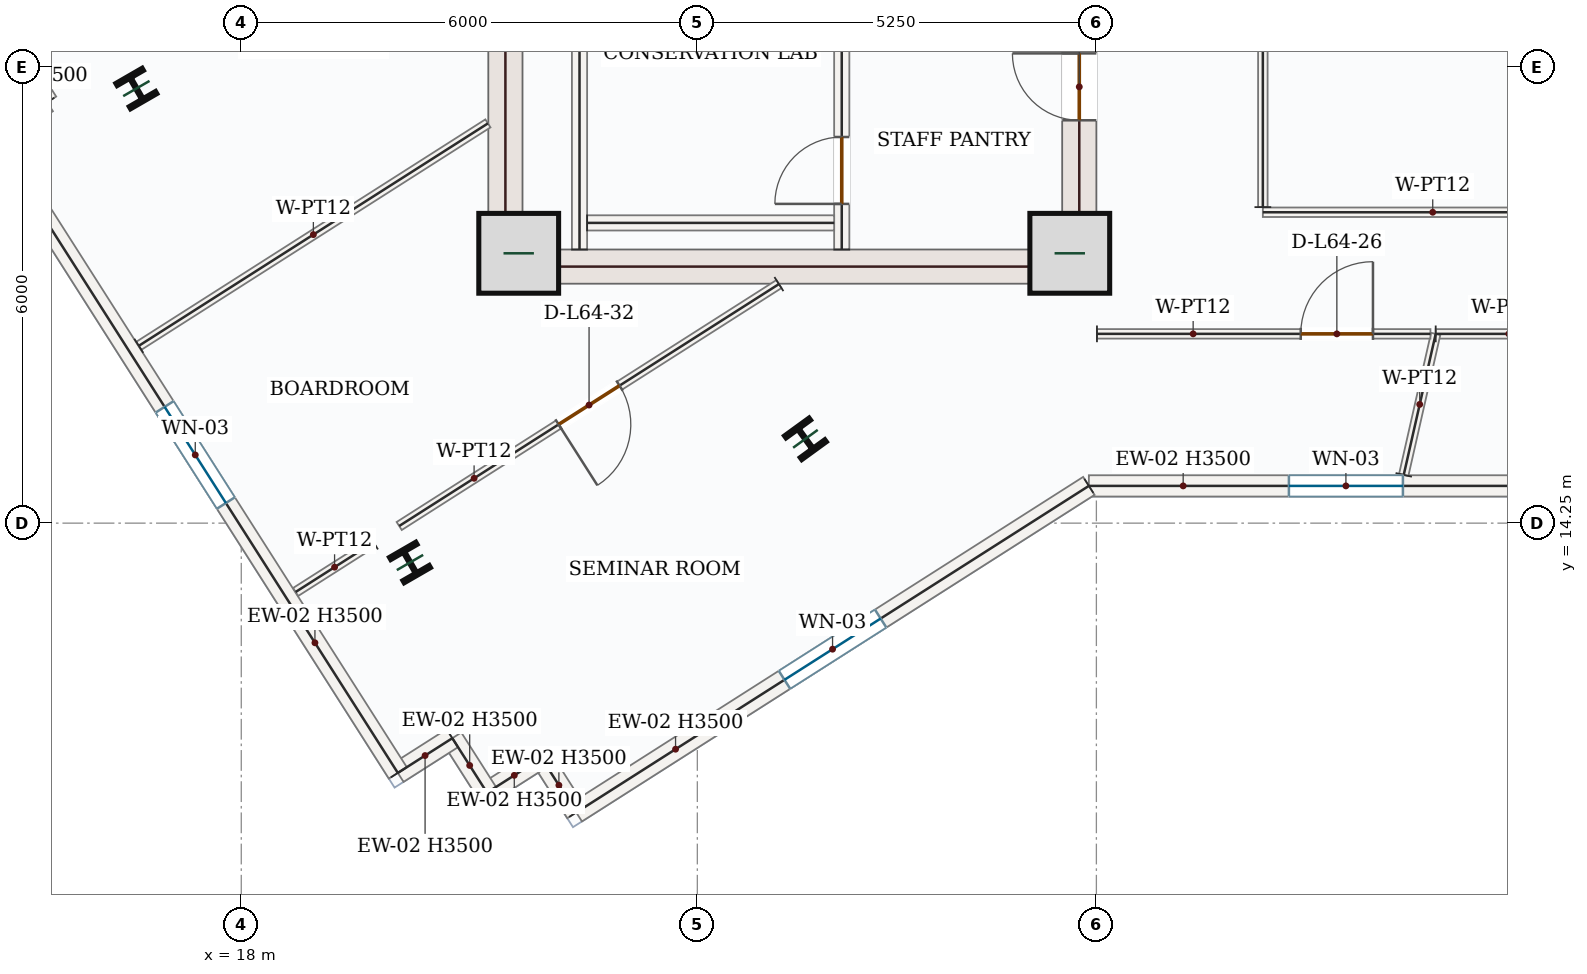
"""IFC4 building model, lengths in metres.
Left out: names, types, materials, properties, quantities, classifications, styles, units other than length and angle.
Written with IfcOpenShell. Run it as: python <this file> out.ifc"""

import sys

from ifc_helpers import new_model, si_unit, direction, frame, frame_2d, origin, origin_2d, place, context, subcontext, project, spatial, rectangle, i_section, extrude, source, transform, mapped, element, fill, save


model = new_model("IFC4")
c1 = context("Model", 3, precision=1e-05, world=origin(), true_north=direction((0.0, 1.0)))
c2 = subcontext(c1, "Body", "Model", "MODEL_VIEW")
j1 = project(units=[si_unit("LENGTHUNIT", "METRE"), si_unit("PLANEANGLEUNIT", "RADIAN")], contexts=[c1])
p1 = place(None, origin())
s1 = spatial("IfcSite", under=j1, at=p1, CompositionType="ELEMENT")
p2 = place(p1, origin())
s2 = spatial("IfcBuilding", under=s1, at=p2, CompositionType="ELEMENT")
p3 = place(p2, frame((0.0, 0.0, 269.1)))
s3 = spatial("IfcBuildingStorey", under=s2, at=p3, CompositionType="ELEMENT", Elevation=269.1)
m1 = source(origin(), c2, "Body", "SweptSolid", [
    extrude(rectangle(XDim=8.55, YDim=0.45, at=frame_2d((4.275, 0.0))), origin(), (0.0, 0.0, 1.0), 3.5),
])
p4 = place(p3, frame((21.475, 17.4, 0.0), z_axis=(0.0, 0.0, 1.0), x_axis=(0.0, 1.0, 0.0)))
e1 = element("IfcWall", 1, at=p4, inside=s3, PredefinedType="SHEAR", context=c2, shape_type="MappedRepresentation", body=[
    mapped(m1, transform((0.0, 0.0, 0.0), x_axis=(1.0, 0.0, 0.0), y_axis=(0.0, 1.0, 0.0), z_axis=(0.0, 0.0, 1.0), scale=1.0)),
])
p5 = place(p3, frame((29.025, 17.4, 0.0), z_axis=(0.0, 0.0, 1.0), x_axis=(0.0, 1.0, 0.0)))
e2 = element("IfcWall", 2, at=p5, inside=s3, PredefinedType="SHEAR", context=c2, shape_type="SweptSolid", body=[
    extrude(rectangle(XDim=8.55, YDim=0.45, at=frame_2d((4.275, 0.0))), origin(), (0.0, 0.0, 1.0), 3.5),
])
p6 = place(p5, frame((6.65, 0.0, 0.0)))
e3 = element("IfcOpeningElement", 3, at=p6, cuts=e2, PredefinedType="OPENING", context=c2, shape_type="SweptSolid", body=[
    extrude(rectangle(XDim=1.1, YDim=2.2, at=frame_2d((0.55, 1.1))), frame((0.0, 0.235, 0.0), z_axis=(0.0, -1.0, 0.0), x_axis=(1.0, 0.0, 0.0)), (0.0, 0.0, 1.0), 0.47),
])
p7 = place(p5, frame((2.15, 0.0, 0.0)))
e4 = element("IfcOpeningElement", 4, at=p7, cuts=e2, PredefinedType="OPENING", context=c2, shape_type="SweptSolid", body=[
    extrude(rectangle(XDim=0.88, YDim=2.1, at=frame_2d((0.44, 1.05))), frame((0.0, 0.235, 0.0), z_axis=(0.0, -1.0, 0.0), x_axis=(1.0, 0.0, 0.0)), (0.0, 0.0, 1.0), 0.47),
])
p8 = place(p5, frame((4.25, 0.0, 0.0)))
e5 = element("IfcOpeningElement", 5, at=p8, cuts=e2, PredefinedType="OPENING", context=c2, shape_type="SweptSolid", body=[
    extrude(rectangle(XDim=0.88, YDim=2.1, at=frame_2d((0.44, 1.05))), frame((0.0, 0.235, 0.0), z_axis=(0.0, -1.0, 0.0), x_axis=(1.0, 0.0, 0.0)), (0.0, 0.0, 1.0), 0.47),
])
m2 = source(origin(), c2, "Body", "SweptSolid", [
    extrude(rectangle(XDim=7.1, YDim=0.45, at=frame_2d((3.55, 0.0))), origin(), (0.0, 0.0, 1.0), 3.5),
])
p9 = place(p3, frame((21.7, 17.625, 0.0), z_axis=(0.0, 0.0, 1.0), x_axis=(1.0, 0.0, 0.0)))
e6 = element("IfcWall", 6, at=p9, inside=s3, PredefinedType="SHEAR", context=c2, shape_type="MappedRepresentation", body=[
    mapped(m2, transform((0.0, 0.0, 0.0), x_axis=(1.0, 0.0, 0.0), y_axis=(0.0, 1.0, 0.0), z_axis=(0.0, 0.0, 1.0), scale=1.0)),
])
m3 = source(origin(), c2, "Body", "SweptSolid", [
    extrude(rectangle(XDim=1.05, YDim=1.05, at=origin_2d()), origin(), (0.0, 0.0, 1.0), 3.75),
])
for number, where, z_axis, x_axis in (
    (7, (21.65, 17.8, 0.0), (0.0, 0.0, 1.0), (1.0, 0.0, 0.0)),
    (8, (28.9, 17.8, 0.0), (0.0, 0.0, 1.0), (1.0, 0.0, 0.0)),
):
    element("IfcColumn", number, at=place(p3, frame(where, z_axis=z_axis, x_axis=x_axis)), inside=s3, PredefinedType="COLUMN", context=c2, shape_type="MappedRepresentation", body=[
        mapped(m3, transform((0.0, 0.0, 0.0), x_axis=(1.0, 0.0, 0.0), y_axis=(0.0, 1.0, 0.0), z_axis=(0.0, 0.0, 1.0), scale=1.0)),
    ])
m4 = source(origin(), c2, "Body", "SweptSolid", [
    extrude(i_section(OverallWidth=0.399, OverallDepth=0.386, WebThickness=0.021, FlangeThickness=0.033, FilletRadius=0.018, at=origin_2d()), origin(), (0.0, 0.0, 1.0), 3.75),
])
for number, where, z_axis, x_axis in (
    (9, (25.422, 15.359, 0.0), (0.0, 0.0, 1.0), (0.809, 0.588, 0.0)),
    (10, (16.62, 19.968, 0.0), (0.0, 0.0, 1.0), (0.866, 0.5, 0.0)),
    (11, (20.22, 13.732, 0.0), (0.0, 0.0, 1.0), (0.866, 0.5, 0.0)),
):
    element("IfcColumn", number, at=place(p3, frame(where, z_axis=z_axis, x_axis=x_axis)), inside=s3, PredefinedType="COLUMN", context=c2, shape_type="MappedRepresentation", body=[
        mapped(m4, transform((0.0, 0.0, 0.0), x_axis=(1.0, 0.0, 0.0), y_axis=(0.0, 1.0, 0.0), z_axis=(0.0, 0.0, 1.0), scale=1.0)),
    ])
p10 = place(p3, frame((35.914, 14.74, 0.0), z_axis=(0.0, 0.0, 1.0), x_axis=(-1.0, 0.0, 0.0)))
e12 = element("IfcWall", 12, at=p10, inside=s3, PredefinedType="SOLIDWALL", context=c2, shape_type="SweptSolid", body=[
    extrude(rectangle(XDim=6.763, YDim=0.28, at=frame_2d((3.381, 0.0))), origin(), (0.0, 0.0, 1.0), 3.5),
])
p11 = place(p10, frame((2.631, 0.0, 0.85)))
e13 = element("IfcOpeningElement", 13, at=p11, cuts=e12, PredefinedType="OPENING", context=c2, shape_type="SweptSolid", body=[
    extrude(rectangle(XDim=1.5, YDim=1.5, at=frame_2d((0.75, 0.75))), frame((0.0, 0.15, 0.0), z_axis=(0.0, -1.0, 0.0), x_axis=(1.0, 0.0, 0.0)), (0.0, 0.0, 1.0), 0.3),
])
p12 = place(p3, frame((29.151, 14.74, 0.0), z_axis=(0.0, 0.0, 1.0), x_axis=(-0.843388565396, -0.537304129669, 0.0)))
e14 = element("IfcWall", 14, at=p12, inside=s3, PredefinedType="SOLIDWALL", context=c2, shape_type="SweptSolid", body=[
    extrude(rectangle(XDim=7.996, YDim=0.28, at=frame_2d((3.998, 0.0))), origin(), (0.0, 0.0, 1.0), 3.5),
])
p13 = place(p12, frame((3.248, 0.0, 0.85)))
e15 = element("IfcOpeningElement", 15, at=p13, cuts=e14, PredefinedType="OPENING", context=c2, shape_type="SweptSolid", body=[
    extrude(rectangle(XDim=1.5, YDim=1.5, at=frame_2d((0.75, 0.75))), frame((0.0, 0.15, 0.0), z_axis=(0.0, -1.0, 0.0), x_axis=(1.0, 0.0, 0.0)), (0.0, 0.0, 1.0), 0.3),
])
m5 = source(origin(), c2, "Body", "SweptSolid", [
    extrude(rectangle(XDim=0.85, YDim=0.28, at=frame_2d((0.425, 0.0))), origin(), (0.0, 0.0, 1.0), 3.5),
])
for number, where, z_axis, x_axis in (
    (16, (22.407, 10.444, 0.0), (0.0, 0.0, 1.0), (-0.537, 0.843, 0.0)),
    (17, (21.95, 11.16, 0.0), (0.0, 0.0, 1.0), (-0.843, -0.537, 0.0)),
    (18, (21.233, 10.704, 0.0), (0.0, 0.0, 1.0), (-0.537, 0.843, 0.0)),
    (19, (20.777, 11.421, 0.0), (0.0, 0.0, 1.0), (-0.843, -0.537, 0.0)),
):
    element("IfcWall", number, at=place(p3, frame(where, z_axis=z_axis, x_axis=x_axis)), inside=s3, PredefinedType="SOLIDWALL", context=c2, shape_type="MappedRepresentation", body=[
        mapped(m5, transform((0.0, 0.0, 0.0), x_axis=(1.0, 0.0, 0.0), y_axis=(0.0, 1.0, 0.0), z_axis=(0.0, 0.0, 1.0), scale=1.0)),
    ])
p14 = place(p3, frame((20.06, 10.964, 0.0), z_axis=(0.0, 0.0, 1.0), x_axis=(-0.537314949054, 0.843381672508, 0.0)))
e20 = element("IfcWall", 20, at=p14, inside=s3, PredefinedType="SOLIDWALL", context=c2, shape_type="SweptSolid", body=[
    extrude(rectangle(XDim=9.92, YDim=0.28, at=frame_2d((4.96, 0.0))), origin(), (0.0, 0.0, 1.0), 3.5),
])
p15 = place(p14, frame((4.21, 0.0, 0.85)))
e21 = element("IfcOpeningElement", 21, at=p15, cuts=e20, PredefinedType="OPENING", context=c2, shape_type="SweptSolid", body=[
    extrude(rectangle(XDim=1.5, YDim=1.5, at=frame_2d((0.75, 0.75))), frame((0.0, 0.15, 0.0), z_axis=(0.0, -1.0, 0.0), x_axis=(1.0, 0.0, 0.0)), (0.0, 0.0, 1.0), 0.3),
])
m6 = source(origin(), c2, "Body", "SweptSolid", [
    extrude(rectangle(XDim=0.85, YDim=0.28, at=frame_2d((0.425, 0.0))), origin(), (0.0, 0.0, 1.0), 3.5),
])
p16 = place(p3, frame((14.73, 19.33, 0.0), z_axis=(0.0, 0.0, 1.0), x_axis=(0.843401251716, 0.537284215853, 0.0)))
e22 = element("IfcWall", 22, at=p16, inside=s3, PredefinedType="SOLIDWALL", context=c2, shape_type="MappedRepresentation", body=[
    mapped(m6, transform((0.0, 0.0, 0.0), x_axis=(1.0, 0.0, 0.0), y_axis=(0.0, 1.0, 0.0), z_axis=(0.0, 0.0, 1.0), scale=1.0)),
])
for number, where, z_axis, x_axis in (
    (23, (15.447, 19.787, 0.0), (0.0, 0.0, 1.0), (-0.537, 0.843, 0.0)),
    (24, (14.99, 20.504, 0.0), (0.0, 0.0, 1.0), (0.843, 0.537, 0.0)),
):
    element("IfcWall", number, at=place(p3, frame(where, z_axis=z_axis, x_axis=x_axis)), inside=s3, PredefinedType="SOLIDWALL", context=c2, shape_type="MappedRepresentation", body=[
        mapped(m5, transform((0.0, 0.0, 0.0), x_axis=(1.0, 0.0, 0.0), y_axis=(0.0, 1.0, 0.0), z_axis=(0.0, 0.0, 1.0), scale=1.0)),
    ])
m7 = source(origin(), c2, "Body", "SweptSolid", [
    extrude(rectangle(XDim=7.87, YDim=0.2, at=frame_2d((3.935, 0.0))), origin(), (0.0, 0.0, 1.0), 3.5),
])
p17 = place(p3, frame((22.45, 17.85, 0.0), z_axis=(0.0, 0.0, 1.0), x_axis=(0.0, 1.0, 0.0)))
e25 = element("IfcWall", 25, at=p17, inside=s3, PredefinedType="SOLIDWALL", context=c2, shape_type="MappedRepresentation", body=[
    mapped(m7, transform((0.0, 0.0, 0.0), x_axis=(1.0, 0.0, 0.0), y_axis=(0.0, 1.0, 0.0), z_axis=(0.0, 0.0, 1.0), scale=1.0)),
])
p18 = place(p3, frame((25.9, 17.85, 0.0), z_axis=(0.0, 0.0, 1.0), x_axis=(0.0, 1.0, 0.0)))
e26 = element("IfcWall", 26, at=p18, inside=s3, PredefinedType="SOLIDWALL", context=c2, shape_type="SweptSolid", body=[
    extrude(rectangle(XDim=8.0, YDim=0.2, at=frame_2d((4.0, 0.0))), origin(), (0.0, 0.0, 1.0), 3.5),
])
p19 = place(p18, frame((6.2, 0.0, 0.0)))
e27 = element("IfcOpeningElement", 27, at=p19, cuts=e26, PredefinedType="OPENING", context=c2, shape_type="SweptSolid", body=[
    extrude(rectangle(XDim=1.0, YDim=2.15, at=frame_2d((0.5, 1.075))), frame((0.0, 0.11, 0.0), z_axis=(0.0, -1.0, 0.0), x_axis=(1.0, 0.0, 0.0)), (0.0, 0.0, 1.0), 0.22),
])
p20 = place(p18, frame((0.6, 0.0, 0.0)))
e28 = element("IfcOpeningElement", 28, at=p20, cuts=e26, PredefinedType="OPENING", context=c2, shape_type="SweptSolid", body=[
    extrude(rectangle(XDim=0.88, YDim=2.1, at=frame_2d((0.44, 1.05))), frame((0.0, 0.11, 0.0), z_axis=(0.0, -1.0, 0.0), x_axis=(1.0, 0.0, 0.0)), (0.0, 0.0, 1.0), 0.22),
])
m8 = source(origin(), c2, "Body", "SweptSolid", [
    extrude(rectangle(XDim=3.25, YDim=0.2, at=frame_2d((1.625, 0.0))), origin(), (0.0, 0.0, 1.0), 3.5),
])
p21 = place(p3, frame((22.55, 18.2, 0.0), z_axis=(0.0, 0.0, 1.0), x_axis=(1.0, 0.0, 0.0)))
e29 = element("IfcWall", 29, at=p21, inside=s3, PredefinedType="SOLIDWALL", context=c2, shape_type="MappedRepresentation", body=[
    mapped(m8, transform((0.0, 0.0, 0.0), x_axis=(1.0, 0.0, 0.0), y_axis=(0.0, 1.0, 0.0), z_axis=(0.0, 0.0, 1.0), scale=1.0)),
])
p22 = place(p3, frame((25.073, 17.395, 0.0), z_axis=(0.0, 0.0, 1.0), x_axis=(-0.843398332862, -0.537288797693, 0.0)))
e30 = element("IfcWall", 30, at=p22, inside=s3, PredefinedType="PARTITIONING", context=c2, shape_type="SweptSolid", body=[
    extrude(rectangle(XDim=5.924, YDim=0.125, at=frame_2d((2.962, 0.0))), origin(), (0.0, 0.0, 1.0), 3.5),
])
p23 = place(p22, frame((2.487, 0.0, 0.0)))
e31 = element("IfcOpeningElement", 31, at=p23, cuts=e30, PredefinedType="OPENING", context=c2, shape_type="SweptSolid", body=[
    extrude(rectangle(XDim=0.95, YDim=2.15, at=frame_2d((0.475, 1.075))), frame((0.0, 0.073, 0.0), z_axis=(0.0, -1.0, 0.0), x_axis=(1.0, 0.0, 0.0)), (0.0, 0.0, 1.0), 0.145),
])
m9 = source(origin(), c2, "Body", "SweptSolid", [
    extrude(rectangle(XDim=1.215, YDim=0.125, at=frame_2d((0.607, 0.0))), origin(), (0.0, 0.0, 1.0), 3.5),
])
p24 = place(p3, frame((19.74, 13.997, 0.0), z_axis=(0.0, 0.0, 1.0), x_axis=(-0.84340481812, -0.537278617453, 0.0)))
e32 = element("IfcWall", 32, at=p24, inside=s3, PredefinedType="PARTITIONING", context=c2, shape_type="MappedRepresentation", body=[
    mapped(m9, transform((0.0, 0.0, 0.0), x_axis=(1.0, 0.0, 0.0), y_axis=(0.0, 1.0, 0.0), z_axis=(0.0, 0.0, 1.0), scale=1.0)),
])
m10 = source(origin(), c2, "Body", "SweptSolid", [
    extrude(rectangle(XDim=5.446, YDim=0.125, at=frame_2d((2.723, 0.0))), origin(), (0.0, 0.0, 1.0), 3.5),
])
p25 = place(p3, frame((16.652, 16.583, 0.0), z_axis=(0.0, 0.0, 1.0), x_axis=(0.843395566027, 0.537293140851, 0.0)))
e33 = element("IfcWall", 33, at=p25, inside=s3, PredefinedType="PARTITIONING", context=c2, shape_type="MappedRepresentation", body=[
    mapped(m10, transform((0.0, 0.0, 0.0), x_axis=(1.0, 0.0, 0.0), y_axis=(0.0, 1.0, 0.0), z_axis=(0.0, 0.0, 1.0), scale=1.0)),
])
m11 = source(origin(), c2, "Body", "SweptSolid", [
    extrude(rectangle(XDim=4.47, YDim=0.125, at=frame_2d((2.235, 0.0))), origin(), (0.0, 0.0, 1.0), 3.5),
])
p26 = place(p3, frame((35.91, 18.34, 0.0), z_axis=(0.0, 0.0, 1.0), x_axis=(-1.0, 0.0, 0.0)))
e34 = element("IfcWall", 34, at=p26, inside=s3, PredefinedType="PARTITIONING", context=c2, shape_type="MappedRepresentation", body=[
    mapped(m11, transform((0.0, 0.0, 0.0), x_axis=(1.0, 0.0, 0.0), y_axis=(0.0, 1.0, 0.0), z_axis=(0.0, 0.0, 1.0), scale=1.0)),
])
m12 = source(origin(), c2, "Body", "SweptSolid", [
    extrude(rectangle(XDim=7.403, YDim=0.125, at=frame_2d((3.701, 0.0))), origin(), (0.0, 0.0, 1.0), 3.5),
])
p27 = place(p3, frame((31.44, 18.407, 0.0), z_axis=(0.0, 0.0, 1.0), x_axis=(0.0, 1.0, 0.0)))
e35 = element("IfcWall", 35, at=p27, inside=s3, PredefinedType="PARTITIONING", context=c2, shape_type="MappedRepresentation", body=[
    mapped(m12, transform((0.0, 0.0, 0.0), x_axis=(1.0, 0.0, 0.0), y_axis=(0.0, 1.0, 0.0), z_axis=(0.0, 0.0, 1.0), scale=1.0)),
])
p28 = place(p3, frame((33.714, 16.74, 0.0), z_axis=(0.0, 0.0, 1.0), x_axis=(1.0, 0.0, 0.0)))
e36 = element("IfcWall", 36, at=p28, inside=s3, PredefinedType="PARTITIONING", context=c2, shape_type="SweptSolid", body=[
    extrude(rectangle(XDim=5.099, YDim=0.125, at=frame_2d((2.55, 0.0))), origin(), (0.0, 0.0, 1.0), 3.5),
])
p29 = place(p28, frame((2.075, 0.0, 0.0)))
e37 = element("IfcOpeningElement", 37, at=p29, cuts=e36, PredefinedType="OPENING", context=c2, shape_type="SweptSolid", body=[
    extrude(rectangle(XDim=0.95, YDim=2.15, at=frame_2d((0.475, 1.075))), frame((0.0, 0.073, 0.0), z_axis=(0.0, -1.0, 0.0), x_axis=(1.0, 0.0, 0.0)), (0.0, 0.0, 1.0), 0.145),
])
m13 = source(origin(), c2, "Body", "SweptSolid", [
    extrude(rectangle(XDim=1.902, YDim=0.125, at=frame_2d((0.951, 0.0))), origin(), (0.0, 0.0, 1.0), 3.5),
])
p30 = place(p3, frame((33.294, 14.885, 0.0), z_axis=(0.0, 0.0, 1.0), x_axis=(0.221032985594, 0.975266332485, 0.0)))
e38 = element("IfcWall", 38, at=p30, inside=s3, PredefinedType="PARTITIONING", context=c2, shape_type="MappedRepresentation", body=[
    mapped(m13, transform((0.0, 0.0, 0.0), x_axis=(1.0, 0.0, 0.0), y_axis=(0.0, 1.0, 0.0), z_axis=(0.0, 0.0, 1.0), scale=1.0)),
])
p31 = place(p3, frame((29.258, 16.74, 0.0), z_axis=(0.0, 0.0, 1.0), x_axis=(0.999999998452, -5.5645206e-05, 0.0)))
e39 = element("IfcWall", 39, at=p31, inside=s3, PredefinedType="PARTITIONING", context=c2, shape_type="SweptSolid", body=[
    extrude(rectangle(XDim=4.387, YDim=0.125, at=frame_2d((2.194, 0.0))), origin(), (0.0, 0.0, 1.0), 3.5),
])
p32 = place(p31, frame((2.681, 0.0, 0.0)))
e40 = element("IfcOpeningElement", 40, at=p32, cuts=e39, PredefinedType="OPENING", context=c2, shape_type="SweptSolid", body=[
    extrude(rectangle(XDim=0.95, YDim=2.15, at=frame_2d((0.475, 1.075))), frame((0.0, 0.073, 0.0), z_axis=(0.0, -1.0, 0.0), x_axis=(1.0, 0.0, 0.0)), (0.0, 0.0, 1.0), 0.145),
])
m14 = source(origin(), c2, "Body", "SweptSolid", [
    extrude(rectangle(XDim=1.5, YDim=1.5, at=frame_2d((0.75, 0.75))), frame((0.0, 0.03, 0.0), z_axis=(0.0, -1.0, 0.0), x_axis=(1.0, 0.0, 0.0)), (0.0, 0.0, 1.0), 0.06),
])
p33 = place(p11, origin())
e41 = element("IfcWindow", 41, at=p33, inside=s3, PartitioningType="SINGLE_PANEL", PredefinedType="WINDOW", context=c2, shape_type="MappedRepresentation", body=[
    mapped(m14, transform((0.0, 0.0, 0.0), x_axis=(1.0, 0.0, 0.0), y_axis=(0.0, 1.0, 0.0), z_axis=(0.0, 0.0, 1.0), scale=1.0)),
])
fill(e13, e41)
p34 = place(p13, origin())
e42 = element("IfcWindow", 42, at=p34, inside=s3, PartitioningType="SINGLE_PANEL", PredefinedType="WINDOW", context=c2, shape_type="MappedRepresentation", body=[
    mapped(m14, transform((0.0, 0.0, 0.0), x_axis=(1.0, 0.0, 0.0), y_axis=(0.0, 1.0, 0.0), z_axis=(0.0, 0.0, 1.0), scale=1.0)),
])
fill(e15, e42)
p35 = place(p15, origin())
e43 = element("IfcWindow", 43, at=p35, inside=s3, PartitioningType="SINGLE_PANEL", PredefinedType="WINDOW", context=c2, shape_type="MappedRepresentation", body=[
    mapped(m14, transform((0.0, 0.0, 0.0), x_axis=(1.0, 0.0, 0.0), y_axis=(0.0, 1.0, 0.0), z_axis=(0.0, 0.0, 1.0), scale=1.0)),
])
fill(e21, e43)
m15 = source(origin(), c2, "Body", "SweptSolid", [
    extrude(rectangle(XDim=0.88, YDim=2.1, at=frame_2d((0.44, 1.05))), frame((0.0, 0.025, 0.0), z_axis=(0.0, -1.0, 0.0), x_axis=(1.0, 0.0, 0.0)), (0.0, 0.0, 1.0), 0.05),
])
p36 = place(p20, origin())
e44 = element("IfcDoor", 44, at=p36, inside=s3, OperationType="SINGLE_SWING_LEFT", PredefinedType="DOOR", context=c2, shape_type="MappedRepresentation", body=[
    mapped(m15, transform((0.0, 0.0, 0.0), x_axis=(1.0, 0.0, 0.0), y_axis=(0.0, 1.0, 0.0), z_axis=(0.0, 0.0, 1.0), scale=1.0)),
])
fill(e28, e44)
p37 = place(p7, origin())
e45 = element("IfcDoor", 45, at=p37, inside=s3, OperationType="SINGLE_SWING_RIGHT", PredefinedType="DOOR", context=c2, shape_type="MappedRepresentation", body=[
    mapped(m15, transform((0.0, 0.0, 0.0), x_axis=(1.0, 0.0, 0.0), y_axis=(0.0, 1.0, 0.0), z_axis=(0.0, 0.0, 1.0), scale=1.0)),
])
fill(e4, e45)
m16 = source(origin(), c2, "Body", "SweptSolid", [
    extrude(rectangle(XDim=0.95, YDim=2.15, at=frame_2d((0.475, 1.075))), frame((0.0, 0.025, 0.0), z_axis=(0.0, -1.0, 0.0), x_axis=(1.0, 0.0, 0.0)), (0.0, 0.0, 1.0), 0.05),
])
p38 = place(p32, origin())
e46 = element("IfcDoor", 46, at=p38, inside=s3, OperationType="SINGLE_SWING_RIGHT", PredefinedType="DOOR", context=c2, shape_type="MappedRepresentation", body=[
    mapped(m16, transform((0.0, 0.0, 0.0), x_axis=(1.0, 0.0, 0.0), y_axis=(0.0, 1.0, 0.0), z_axis=(0.0, 0.0, 1.0), scale=1.0)),
])
fill(e40, e46)
p39 = place(p23, origin())
e47 = element("IfcDoor", 47, at=p39, inside=s3, OperationType="SINGLE_SWING_RIGHT", PredefinedType="DOOR", context=c2, shape_type="MappedRepresentation", body=[
    mapped(m16, transform((0.0, 0.0, 0.0), x_axis=(1.0, 0.0, 0.0), y_axis=(0.0, 1.0, 0.0), z_axis=(0.0, 0.0, 1.0), scale=1.0)),
])
fill(e31, e47)
save(model, sys.argv[1])
